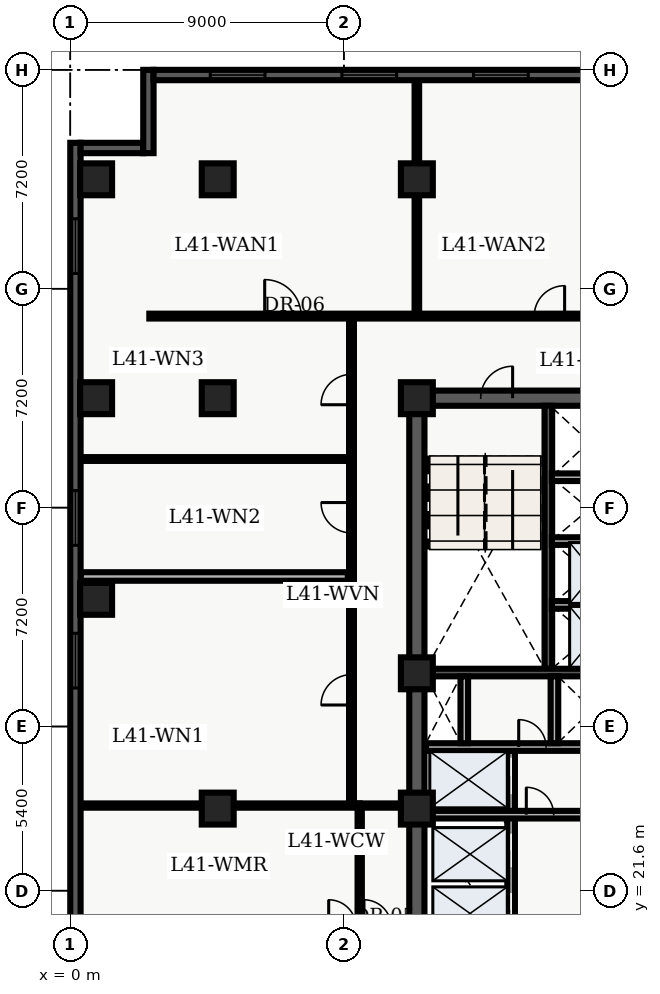
"""IFC4 building model, lengths in metres.
Left out: names, types, materials, properties, quantities, classifications, styles, units other than length and angle.
Written with IfcOpenShell. Run it as: python <this file> out.ifc"""

import sys

from ifc_helpers import new_model, entity, si_unit, converted_unit, direction, frame, origin_with_axes, origin_2d_with_axis, place, context, subcontext, project, spatial, polyline, rectangle, outline, extrude, element, fill, save


model = new_model("IFC4")
c1 = context("Model", 3, precision=1e-05, world=origin_with_axes(), true_north=direction((0.0, 1.0)))
c2 = subcontext(c1, "Body", "Model", "MODEL_VIEW")
j1 = project(units=[si_unit("LENGTHUNIT", "METRE"), converted_unit("PLANEANGLEUNIT", "DEGREE", entity("IfcPlaneAngleMeasure", 0.017), si_unit("PLANEANGLEUNIT", "RADIAN"), dimensions=[0, 0, 0, 0, 0, 0, 0])], contexts=[c1])
p1 = place(None, origin_with_axes())
s1 = spatial("IfcSite", under=j1, at=p1, CompositionType="ELEMENT")
p2 = place(p1, origin_with_axes())
s2 = spatial("IfcBuilding", under=s1, at=p2, CompositionType="ELEMENT")
p3 = place(p2, frame((0.0, 0.0, 168.0), z_axis=(0.0, 0.0, 1.0), x_axis=(1.0, 0.0, 0.0)))
s3 = spatial("IfcBuildingStorey", under=s2, at=p3, CompositionType="ELEMENT", Elevation=168.0)
p4 = place(p3, frame((11.4, 10.8, 0.0), z_axis=(0.0, 0.0, 1.0), x_axis=(0.0, 1.0, 0.0)))
e1 = element("IfcWall", 1, at=p4, inside=s3, PredefinedType="SHEAR", context=c2, shape_type="SweptSolid", body=[
    extrude(outline(polyline([(0.0, -0.25), (27.0, -0.25), (27.0, 0.25), (0.0, 0.25), (0.0, -0.25)])), origin_with_axes(), (0.0, 0.0, 1.0), 3.66),
])
p5 = place(p3, frame((11.4, 37.8, 0.0), z_axis=(0.0, 0.0, 1.0), x_axis=(1.0, 0.0, 0.0)))
e2 = element("IfcWall", 2, at=p5, inside=s3, PredefinedType="SHEAR", context=c2, shape_type="SweptSolid", body=[
    extrude(outline(polyline([(0.0, -0.25), (7.2, -0.25), (7.2, 0.25), (0.0, 0.25), (0.0, -0.25)])), origin_with_axes(), (0.0, 0.0, 1.0), 3.66),
])
p6 = place(p5, frame((2.625, 0.0, 0.0), z_axis=(0.0, 0.0, 1.0), x_axis=(1.0, 0.0, 0.0)))
e3 = element("IfcOpeningElement", 3, at=p6, cuts=e2, PredefinedType="OPENING", context=c2, shape_type="SweptSolid", body=[
    extrude(rectangle(XDim=1.05, YDim=0.52, at=origin_2d_with_axis()), origin_with_axes(), (0.0, 0.0, 1.0), 2.15),
])
p7 = place(p3, frame((15.725, 28.9, 0.0), z_axis=(0.0, 0.0, 1.0), x_axis=(0.0, 1.0, 0.0)))
e4 = element("IfcWall", 4, at=p7, inside=s3, PredefinedType="SHEAR", context=c2, shape_type="SweptSolid", body=[
    extrude(outline(polyline([(0.0, -0.125), (8.65, -0.125), (8.65, 0.125), (0.0, 0.125), (0.0, -0.125)])), origin_with_axes(), (0.0, 0.0, 1.0), 3.66),
])
p8 = place(p3, frame((11.65, 28.775, 0.0), z_axis=(0.0, 0.0, 1.0), x_axis=(1.0, 0.0, 0.0)))
e5 = element("IfcWall", 5, at=p8, inside=s3, PredefinedType="SHEAR", context=c2, shape_type="SweptSolid", body=[
    extrude(outline(polyline([(0.0, -0.125), (6.7, -0.125), (6.7, 0.125), (0.0, 0.125), (0.0, -0.125)])), origin_with_axes(), (0.0, 0.0, 1.0), 3.66),
])
p9 = place(p3, frame((14.5, 19.95, 0.0), z_axis=(0.0, 0.0, 1.0), x_axis=(0.0, 1.0, 0.0)))
e6 = element("IfcWall", 6, at=p9, inside=s3, PredefinedType="SOLIDWALL", context=c2, shape_type="SweptSolid", body=[
    extrude(outline(polyline([(0.0, -0.125), (6.25, -0.125), (6.25, 0.125), (0.0, 0.125), (0.0, -0.125)])), origin_with_axes(), (0.0, 0.0, 1.0), 2.7),
])
p10 = place(p9, frame((1.025, 0.0, 0.0), z_axis=(0.0, 0.0, 1.0), x_axis=(1.0, 0.0, 0.0)))
e7 = element("IfcOpeningElement", 7, at=p10, cuts=e6, PredefinedType="OPENING", context=c2, shape_type="SweptSolid", body=[
    extrude(rectangle(XDim=1.1, YDim=0.27, at=origin_2d_with_axis()), origin_with_axes(), (0.0, 0.0, 1.0), 2.15),
])
p11 = place(p9, frame((2.975, 0.0, 0.0), z_axis=(0.0, 0.0, 1.0), x_axis=(1.0, 0.0, 0.0)))
e8 = element("IfcOpeningElement", 8, at=p11, cuts=e6, PredefinedType="OPENING", context=c2, shape_type="SweptSolid", body=[
    extrude(rectangle(XDim=1.1, YDim=0.27, at=origin_2d_with_axis()), origin_with_axes(), (0.0, 0.0, 1.0), 2.15),
])
p12 = place(p9, frame((5.425, 0.0, 0.0), z_axis=(0.0, 0.0, 1.0), x_axis=(1.0, 0.0, 0.0)))
e9 = element("IfcOpeningElement", 9, at=p12, cuts=e6, PredefinedType="OPENING", context=c2, shape_type="SweptSolid", body=[
    extrude(rectangle(XDim=1.2, YDim=0.27, at=origin_2d_with_axis()), origin_with_axes(), (0.0, 0.0, 1.0), 2.15),
])
p13 = place(p3, frame((11.7, 24.1, 0.0), z_axis=(0.0, 0.0, 1.0), x_axis=(1.0, 0.0, 0.0)))
e10 = element("IfcWall", 10, at=p13, inside=s3, PredefinedType="SOLIDWALL", context=c2, shape_type="SweptSolid", body=[
    extrude(outline(polyline([(0.0, -0.125), (6.6, -0.125), (6.6, 0.125), (0.0, 0.125), (0.0, -0.125)])), origin_with_axes(), (0.0, 0.0, 1.0), 2.7),
])
p14 = place(p13, frame((3.75, 0.0, 0.0), z_axis=(0.0, 0.0, 1.0), x_axis=(1.0, 0.0, 0.0)))
e11 = element("IfcOpeningElement", 11, at=p14, cuts=e10, PredefinedType="OPENING", context=c2, shape_type="SweptSolid", body=[
    extrude(rectangle(XDim=0.9, YDim=0.27, at=origin_2d_with_axis()), origin_with_axes(), (0.0, 0.0, 1.0), 2.15),
])
p15 = place(p3, frame((11.7, 26.325, 0.0), z_axis=(0.0, 0.0, 1.0), x_axis=(1.0, 0.0, 0.0)))
e12 = element("IfcWall", 12, at=p15, inside=s3, PredefinedType="SOLIDWALL", context=c2, shape_type="SweptSolid", body=[
    extrude(outline(polyline([(0.0, -0.125), (6.6, -0.125), (6.6, 0.125), (0.0, 0.125), (0.0, -0.125)])), origin_with_axes(), (0.0, 0.0, 1.0), 2.7),
])
p16 = place(p15, frame((3.5, 0.0, 0.0), z_axis=(0.0, 0.0, 1.0), x_axis=(1.0, 0.0, 0.0)))
e13 = element("IfcOpeningElement", 13, at=p16, cuts=e12, PredefinedType="OPENING", context=c2, shape_type="SweptSolid", body=[
    extrude(rectangle(XDim=0.9, YDim=0.27, at=origin_2d_with_axis()), origin_with_axes(), (0.0, 0.0, 1.0), 2.15),
])
for number, where, z_axis, x_axis in (
    (14, (12.96, 26.45, 0.0), (0.0, 0.0, 1.0), (0.0, 1.0, 0.0)),
    (15, (15.925, 26.45, 0.0), (0.0, 0.0, 1.0), (0.0, 1.0, 0.0)),
):
    element("IfcWall", number, at=place(p3, frame(where, z_axis=z_axis, x_axis=x_axis)), inside=s3, PredefinedType="SOLIDWALL", context=c2, shape_type="SweptSolid", body=[
        extrude(outline(polyline([(0.0, -0.125), (2.2, -0.125), (2.2, 0.125), (0.0, 0.125), (0.0, -0.125)])), origin_with_axes(), (0.0, 0.0, 1.0), 2.7),
    ])
for number, where, z_axis, x_axis in (
    (16, (11.4, 24.3, 0.0), (0.0, 0.0, 1.0), (1.0, 0.0, 0.0)),
    (17, (11.4, 28.75, 0.0), (0.0, 0.0, 1.0), (1.0, 0.0, 0.0)),
    (18, (11.4, 37.8, 0.0), (0.0, 0.0, 1.0), (1.0, 0.0, 0.0)),
    (19, (11.4, 45.0, 0.0), (0.0, 0.0, 1.0), (1.0, 0.0, 0.0)),
    (20, (4.85, 24.3, 0.0), (0.0, 0.0, 1.0), (1.0, 0.0, 0.0)),
    (21, (4.85, 37.8, 0.0), (0.0, 0.0, 1.0), (1.0, 0.0, 0.0)),
    (22, (4.85, 45.0, 0.0), (0.0, 0.0, 1.0), (1.0, 0.0, 0.0)),
    (23, (0.85, 31.2, 0.0), (0.0, 0.0, 1.0), (1.0, 0.0, 0.0)),
    (24, (0.85, 37.8, 0.0), (0.0, 0.0, 1.0), (1.0, 0.0, 0.0)),
    (25, (0.85, 45.0, 0.0), (0.0, 0.0, 1.0), (1.0, 0.0, 0.0)),
):
    element("IfcColumn", number, at=place(p3, frame(where, z_axis=z_axis, x_axis=x_axis)), inside=s3, PredefinedType="COLUMN", context=c2, shape_type="SweptSolid", body=[
        extrude(rectangle(XDim=1.05, YDim=1.05, at=origin_2d_with_axis()), origin_with_axes(), (0.0, 0.0, 1.0), 3.9),
    ])
for number, where, z_axis, x_axis in (
    (26, (15.84, 31.0, 0.0), (0.0, 0.0, 1.0), (1.0, 0.0, 0.0)),
    (27, (15.84, 33.1, 0.0), (0.0, 0.0, 1.0), (1.0, 0.0, 0.0)),
    (28, (15.84, 35.2, 0.0), (0.0, 0.0, 1.0), (1.0, 0.0, 0.0)),
):
    element("IfcWall", number, at=place(p3, frame(where, z_axis=z_axis, x_axis=x_axis)), inside=s3, PredefinedType="SOLIDWALL", context=c2, shape_type="SweptSolid", body=[
        extrude(outline(polyline([(0.0, -0.125), (2.46, -0.125), (2.46, 0.125), (0.0, 0.125), (0.0, -0.125)])), origin_with_axes(), (0.0, 0.0, 1.0), 2.7),
    ])
p17 = place(p3, frame((9.52, 20.4, 0.0), z_axis=(0.0, 0.0, 1.0), x_axis=(0.0, 1.0, 0.0)))
e29 = element("IfcWall", 29, at=p17, inside=s3, PredefinedType="PARTITIONING", context=c2, shape_type="SweptSolid", body=[
    extrude(outline(polyline([(0.0, -0.07), (4.0, -0.07), (4.0, 0.07), (0.0, 0.07), (0.0, -0.07)])), origin_with_axes(), (0.0, 0.0, 1.0), 2.7),
])
p18 = place(p3, frame((9.52, 24.4, 0.0), z_axis=(0.0, 0.0, 1.0), x_axis=(1.0, 0.0, 0.0)))
e30 = element("IfcWall", 30, at=p18, inside=s3, PredefinedType="PARTITIONING", context=c2, shape_type="SweptSolid", body=[
    extrude(outline(polyline([(0.0, -0.07), (1.58, -0.07), (1.58, 0.07), (0.0, 0.07), (0.0, -0.07)])), origin_with_axes(), (0.0, 0.0, 1.0), 2.7),
])
p19 = place(p3, frame((2.6, 40.5, 0.0), z_axis=(0.0, 0.0, 1.0), x_axis=(1.0, 0.0, 0.0)))
e31 = element("IfcWall", 31, at=p19, inside=s3, PredefinedType="PARTITIONING", context=c2, shape_type="SweptSolid", body=[
    extrude(outline(polyline([(0.0, -0.08), (21.324, -0.08), (21.324, 0.08), (0.0, 0.08), (0.0, -0.08)])), origin_with_axes(), (0.0, 0.0, 1.0), 2.7),
])
p20 = place(p19, frame((4.395, 0.0, 0.0), z_axis=(0.0, 0.0, 1.0), x_axis=(1.0, 0.0, 0.0)))
e32 = element("IfcOpeningElement", 32, at=p20, cuts=e31, PredefinedType="OPENING", context=c2, shape_type="SweptSolid", body=[
    extrude(rectangle(XDim=1.2, YDim=0.18, at=origin_2d_with_axis()), origin_with_axes(), (0.0, 0.0, 1.0), 2.2),
])
p21 = place(p19, frame((13.16, 0.0, 0.0), z_axis=(0.0, 0.0, 1.0), x_axis=(1.0, 0.0, 0.0)))
e33 = element("IfcOpeningElement", 33, at=p21, cuts=e31, PredefinedType="OPENING", context=c2, shape_type="SweptSolid", body=[
    extrude(rectangle(XDim=1.0, YDim=0.18, at=origin_2d_with_axis()), origin_with_axes(), (0.0, 0.0, 1.0), 2.15),
])
p22 = place(p3, frame((9.25, 24.4, 0.0), z_axis=(0.0, 0.0, 1.0), x_axis=(0.0, 1.0, 0.0)))
e34 = element("IfcWall", 34, at=p22, inside=s3, PredefinedType="PARTITIONING", context=c2, shape_type="SweptSolid", body=[
    extrude(outline(polyline([(0.0, -0.08), (16.1, -0.08), (16.1, 0.08), (0.0, 0.08), (0.0, -0.08)])), origin_with_axes(), (0.0, 0.0, 1.0), 2.7),
])
p23 = place(p22, frame((3.808, 0.0, 0.0), z_axis=(0.0, 0.0, 1.0), x_axis=(1.0, 0.0, 0.0)))
e35 = element("IfcOpeningElement", 35, at=p23, cuts=e34, PredefinedType="OPENING", context=c2, shape_type="SweptSolid", body=[
    extrude(rectangle(XDim=1.0, YDim=0.18, at=origin_2d_with_axis()), origin_with_axes(), (0.0, 0.0, 1.0), 2.15),
])
p24 = place(p22, frame((9.467, 0.0, 0.0), z_axis=(0.0, 0.0, 1.0), x_axis=(1.0, 0.0, 0.0)))
e36 = element("IfcOpeningElement", 36, at=p24, cuts=e34, PredefinedType="OPENING", context=c2, shape_type="SweptSolid", body=[
    extrude(rectangle(XDim=1.0, YDim=0.18, at=origin_2d_with_axis()), origin_with_axes(), (0.0, 0.0, 1.0), 2.15),
])
p25 = place(p22, frame((13.684, 0.0, 0.0), z_axis=(0.0, 0.0, 1.0), x_axis=(1.0, 0.0, 0.0)))
e37 = element("IfcOpeningElement", 37, at=p25, cuts=e34, PredefinedType="OPENING", context=c2, shape_type="SweptSolid", body=[
    extrude(rectangle(XDim=1.0, YDim=0.18, at=origin_2d_with_axis()), origin_with_axes(), (0.0, 0.0, 1.0), 2.15),
])
p26 = place(p3, frame((0.335, 24.4, 0.0), z_axis=(0.0, 0.0, 1.0), x_axis=(1.0, 0.0, 0.0)))
e38 = element("IfcWall", 38, at=p26, inside=s3, PredefinedType="PARTITIONING", context=c2, shape_type="SweptSolid", body=[
    extrude(outline(polyline([(0.0, -0.07), (9.185, -0.07), (9.185, 0.07), (0.0, 0.07), (0.0, -0.07)])), origin_with_axes(), (0.0, 0.0, 1.0), 2.7),
])
p27 = place(p3, frame((0.335, 31.935, 0.0), z_axis=(0.0, 0.0, 1.0), x_axis=(1.0, 0.0, 0.0)))
e39 = element("IfcWall", 39, at=p27, inside=s3, PredefinedType="PARTITIONING", context=c2, shape_type="SweptSolid", body=[
    extrude(outline(polyline([(0.0, -0.14), (8.795, -0.14), (8.795, 0.14), (0.0, 0.14), (0.0, -0.14)])), origin_with_axes(), (0.0, 0.0, 1.0), 2.7),
])
p28 = place(p3, frame((0.335, 35.799, 0.0), z_axis=(0.0, 0.0, 1.0), x_axis=(1.0, 0.0, 0.0)))
e40 = element("IfcWall", 40, at=p28, inside=s3, PredefinedType="PARTITIONING", context=c2, shape_type="SweptSolid", body=[
    extrude(outline(polyline([(0.0, -0.062), (8.795, -0.062), (8.795, 0.062), (0.0, 0.062), (0.0, -0.062)])), origin_with_axes(), (0.0, 0.0, 1.0), 2.7),
])
p29 = place(p3, frame((11.4, 40.6, 0.0), z_axis=(0.0, 0.0, 1.0), x_axis=(0.0, 1.0, 0.0)))
e41 = element("IfcWall", 41, at=p29, inside=s3, PredefinedType="PARTITIONING", context=c2, shape_type="SweptSolid", body=[
    extrude(outline(polyline([(0.0, -0.075), (7.665, -0.075), (7.665, 0.075), (0.0, 0.075), (0.0, -0.075)])), origin_with_axes(), (0.0, 0.0, 1.0), 2.7),
])
p30 = place(p3, frame((0.17, 2.74, 0.0), z_axis=(0.0, 0.0, 1.0), x_axis=(0.0, 1.0, 0.0)))
e42 = element("IfcWall", 42, at=p30, inside=s3, PredefinedType="SOLIDWALL", context=c2, shape_type="SweptSolid", body=[
    extrude(outline(polyline([(0.0, -0.17), (43.46, -0.17), (43.46, 0.17), (0.0, 0.17), (0.0, -0.17)])), origin_with_axes(), (0.0, 0.0, 1.0), 3.66),
])
p31 = place(p30, frame((2.948, 0.0, 0.45), z_axis=(0.0, 0.0, 1.0), x_axis=(1.0, 0.0, 0.0)))
e43 = element("IfcOpeningElement", 43, at=p31, cuts=e42, PredefinedType="OPENING", context=c2, shape_type="SweptSolid", body=[
    extrude(rectangle(XDim=1.8, YDim=0.36, at=origin_2d_with_axis()), origin_with_axes(), (0.0, 0.0, 1.0), 2.1),
])
p32 = place(p30, frame((12.339, 0.0, 0.45), z_axis=(0.0, 0.0, 1.0), x_axis=(1.0, 0.0, 0.0)))
e44 = element("IfcOpeningElement", 44, at=p32, cuts=e42, PredefinedType="OPENING", context=c2, shape_type="SweptSolid", body=[
    extrude(rectangle(XDim=1.8, YDim=0.36, at=origin_2d_with_axis()), origin_with_axes(), (0.0, 0.0, 1.0), 2.1),
])
p33 = place(p30, frame((26.426, 0.0, 0.45), z_axis=(0.0, 0.0, 1.0), x_axis=(1.0, 0.0, 0.0)))
e45 = element("IfcOpeningElement", 45, at=p33, cuts=e42, PredefinedType="OPENING", context=c2, shape_type="SweptSolid", body=[
    extrude(rectangle(XDim=1.8, YDim=0.36, at=origin_2d_with_axis()), origin_with_axes(), (0.0, 0.0, 1.0), 2.1),
])
p34 = place(p30, frame((31.121, 0.0, 0.45), z_axis=(0.0, 0.0, 1.0), x_axis=(1.0, 0.0, 0.0)))
e46 = element("IfcOpeningElement", 46, at=p34, cuts=e42, PredefinedType="OPENING", context=c2, shape_type="SweptSolid", body=[
    extrude(rectangle(XDim=1.8, YDim=0.36, at=origin_2d_with_axis()), origin_with_axes(), (0.0, 0.0, 1.0), 2.1),
])
p35 = place(p30, frame((40.062, 0.0, 0.45), z_axis=(0.0, 0.0, 1.0), x_axis=(1.0, 0.0, 0.0)))
e47 = element("IfcOpeningElement", 47, at=p35, cuts=e42, PredefinedType="OPENING", context=c2, shape_type="SweptSolid", body=[
    extrude(rectangle(XDim=1.8, YDim=0.36, at=origin_2d_with_axis()), origin_with_axes(), (0.0, 0.0, 1.0), 2.1),
])
p36 = place(p3, frame((0.34, 46.03, 0.0), z_axis=(0.0, 0.0, 1.0), x_axis=(1.0, 0.0, 0.0)))
e48 = element("IfcWall", 48, at=p36, inside=s3, PredefinedType="SOLIDWALL", context=c2, shape_type="SweptSolid", body=[
    extrude(outline(polyline([(0.0, -0.17), (2.06, -0.17), (2.06, 0.17), (0.0, 0.17), (0.0, -0.17)])), origin_with_axes(), (0.0, 0.0, 1.0), 3.66),
])
p37 = place(p3, frame((2.57, 45.86, 0.0), z_axis=(0.0, 0.0, 1.0), x_axis=(0.0, 1.0, 0.0)))
e49 = element("IfcWall", 49, at=p37, inside=s3, PredefinedType="SOLIDWALL", context=c2, shape_type="SweptSolid", body=[
    extrude(outline(polyline([(0.0, -0.17), (2.74, -0.17), (2.74, 0.17), (0.0, 0.17), (0.0, -0.17)])), origin_with_axes(), (0.0, 0.0, 1.0), 3.66),
])
p38 = place(p3, frame((2.74, 48.43, 0.0), z_axis=(0.0, 0.0, 1.0), x_axis=(1.0, 0.0, 0.0)))
e50 = element("IfcWall", 50, at=p38, inside=s3, PredefinedType="SOLIDWALL", context=c2, shape_type="SweptSolid", body=[
    extrude(outline(polyline([(0.0, -0.17), (18.519, -0.17), (18.519, 0.17), (0.0, 0.17), (0.0, -0.17)])), origin_with_axes(), (0.0, 0.0, 1.0), 3.66),
])
p39 = place(p38, frame((2.765, 0.0, 0.45), z_axis=(0.0, 0.0, 1.0), x_axis=(1.0, 0.0, 0.0)))
e51 = element("IfcOpeningElement", 51, at=p39, cuts=e50, PredefinedType="OPENING", context=c2, shape_type="SweptSolid", body=[
    extrude(rectangle(XDim=1.8, YDim=0.36, at=origin_2d_with_axis()), origin_with_axes(), (0.0, 0.0, 1.0), 2.1),
])
p40 = place(p38, frame((7.095, 0.0, 0.45), z_axis=(0.0, 0.0, 1.0), x_axis=(1.0, 0.0, 0.0)))
e52 = element("IfcOpeningElement", 52, at=p40, cuts=e50, PredefinedType="OPENING", context=c2, shape_type="SweptSolid", body=[
    extrude(rectangle(XDim=1.8, YDim=0.36, at=origin_2d_with_axis()), origin_with_axes(), (0.0, 0.0, 1.0), 2.1),
])
p41 = place(p38, frame((11.424, 0.0, 0.45), z_axis=(0.0, 0.0, 1.0), x_axis=(1.0, 0.0, 0.0)))
e53 = element("IfcOpeningElement", 53, at=p41, cuts=e50, PredefinedType="OPENING", context=c2, shape_type="SweptSolid", body=[
    extrude(rectangle(XDim=1.8, YDim=0.36, at=origin_2d_with_axis()), origin_with_axes(), (0.0, 0.0, 1.0), 2.1),
])
p42 = place(p38, frame((15.754, 0.0, 0.45), z_axis=(0.0, 0.0, 1.0), x_axis=(1.0, 0.0, 0.0)))
e54 = element("IfcOpeningElement", 54, at=p42, cuts=e50, PredefinedType="OPENING", context=c2, shape_type="SweptSolid", body=[
    extrude(rectangle(XDim=1.8, YDim=0.36, at=origin_2d_with_axis()), origin_with_axes(), (0.0, 0.0, 1.0), 2.1),
])
p43 = place(p9, frame((1.025, 0.0, 0.0), z_axis=(0.0, 0.0, 1.0), x_axis=(1.0, 0.0, 0.0)))
e55 = element("IfcDoor", 55, at=p43, inside=s3, OperationType="SLIDING_TO_LEFT", PredefinedType="DOOR", context=c2, shape_type="SweptSolid", body=[
    extrude(rectangle(XDim=1.1, YDim=0.09, at=origin_2d_with_axis()), origin_with_axes(), (0.0, 0.0, 1.0), 2.15),
])
fill(e7, e55)
p44 = place(p9, frame((2.975, 0.0, 0.0), z_axis=(0.0, 0.0, 1.0), x_axis=(1.0, 0.0, 0.0)))
e56 = element("IfcDoor", 56, at=p44, inside=s3, OperationType="SLIDING_TO_RIGHT", PredefinedType="DOOR", context=c2, shape_type="SweptSolid", body=[
    extrude(rectangle(XDim=1.1, YDim=0.09, at=origin_2d_with_axis()), origin_with_axes(), (0.0, 0.0, 1.0), 2.15),
])
fill(e8, e56)
p45 = place(p9, frame((5.425, 0.0, 0.0), z_axis=(0.0, 0.0, 1.0), x_axis=(1.0, 0.0, 0.0)))
e57 = element("IfcDoor", 57, at=p45, inside=s3, OperationType="DOUBLE_DOOR_SLIDING", PredefinedType="DOOR", context=c2, shape_type="SweptSolid", body=[
    extrude(rectangle(XDim=1.2, YDim=0.09, at=origin_2d_with_axis()), origin_with_axes(), (0.0, 0.0, 1.0), 2.15),
])
fill(e9, e57)
p46 = place(p5, frame((2.625, 0.0, 0.0), z_axis=(0.0, 0.0, 1.0), x_axis=(1.0, 0.0, 0.0)))
e58 = element("IfcDoor", 58, at=p46, inside=s3, OperationType="SINGLE_SWING_RIGHT", PredefinedType="DOOR", context=c2, shape_type="SweptSolid", body=[
    extrude(rectangle(XDim=1.05, YDim=0.09, at=origin_2d_with_axis()), origin_with_axes(), (0.0, 0.0, 1.0), 2.15),
])
fill(e3, e58)
p47 = place(p13, frame((3.75, 0.0, 0.0), z_axis=(0.0, 0.0, 1.0), x_axis=(1.0, 0.0, 0.0)))
e59 = element("IfcDoor", 59, at=p47, inside=s3, OperationType="SINGLE_SWING_LEFT", PredefinedType="DOOR", context=c2, shape_type="SweptSolid", body=[
    extrude(rectangle(XDim=0.9, YDim=0.09, at=origin_2d_with_axis()), origin_with_axes(), (0.0, 0.0, 1.0), 2.15),
])
fill(e11, e59)
p48 = place(p15, frame((3.5, 0.0, 0.0), z_axis=(0.0, 0.0, 1.0), x_axis=(1.0, 0.0, 0.0)))
e60 = element("IfcDoor", 60, at=p48, inside=s3, OperationType="SINGLE_SWING_LEFT", PredefinedType="DOOR", context=c2, shape_type="SweptSolid", body=[
    extrude(rectangle(XDim=0.9, YDim=0.09, at=origin_2d_with_axis()), origin_with_axes(), (0.0, 0.0, 1.0), 2.15),
])
fill(e13, e60)
p49 = place(p22, frame((3.808, 0.0, 0.0), z_axis=(0.0, 0.0, 1.0), x_axis=(1.0, 0.0, 0.0)))
e61 = element("IfcDoor", 61, at=p49, inside=s3, OperationType="SINGLE_SWING_LEFT", PredefinedType="DOOR", context=c2, shape_type="SweptSolid", body=[
    extrude(rectangle(XDim=1.0, YDim=0.09, at=origin_2d_with_axis()), origin_with_axes(), (0.0, 0.0, 1.0), 2.15),
])
fill(e35, e61)
p50 = place(p22, frame((9.467, 0.0, 0.0), z_axis=(0.0, 0.0, 1.0), x_axis=(1.0, 0.0, 0.0)))
e62 = element("IfcDoor", 62, at=p50, inside=s3, OperationType="SINGLE_SWING_RIGHT", PredefinedType="DOOR", context=c2, shape_type="SweptSolid", body=[
    extrude(rectangle(XDim=1.0, YDim=0.09, at=origin_2d_with_axis()), origin_with_axes(), (0.0, 0.0, 1.0), 2.15),
])
fill(e36, e62)
p51 = place(p22, frame((13.684, 0.0, 0.0), z_axis=(0.0, 0.0, 1.0), x_axis=(1.0, 0.0, 0.0)))
e63 = element("IfcDoor", 63, at=p51, inside=s3, OperationType="SINGLE_SWING_LEFT", PredefinedType="DOOR", context=c2, shape_type="SweptSolid", body=[
    extrude(rectangle(XDim=1.0, YDim=0.09, at=origin_2d_with_axis()), origin_with_axes(), (0.0, 0.0, 1.0), 2.15),
])
fill(e37, e63)
p52 = place(p19, frame((4.395, 0.0, 0.0), z_axis=(0.0, 0.0, 1.0), x_axis=(1.0, 0.0, 0.0)))
e64 = element("IfcDoor", 64, at=p52, inside=s3, OperationType="SINGLE_SWING_LEFT", PredefinedType="DOOR", context=c2, shape_type="SweptSolid", body=[
    extrude(rectangle(XDim=1.2, YDim=0.09, at=origin_2d_with_axis()), origin_with_axes(), (0.0, 0.0, 1.0), 2.2),
])
fill(e32, e64)
p53 = place(p19, frame((13.16, 0.0, 0.0), z_axis=(0.0, 0.0, 1.0), x_axis=(1.0, 0.0, 0.0)))
e65 = element("IfcDoor", 65, at=p53, inside=s3, OperationType="SINGLE_SWING_RIGHT", PredefinedType="DOOR", context=c2, shape_type="SweptSolid", body=[
    extrude(rectangle(XDim=1.0, YDim=0.09, at=origin_2d_with_axis()), origin_with_axes(), (0.0, 0.0, 1.0), 2.15),
])
fill(e33, e65)
p54 = place(p30, frame((26.426, 0.0, 0.45), z_axis=(0.0, 0.0, 1.0), x_axis=(1.0, 0.0, 0.0)))
e66 = element("IfcWindow", 66, at=p54, inside=s3, PredefinedType="WINDOW", context=c2, shape_type="SweptSolid", body=[
    extrude(rectangle(XDim=1.8, YDim=0.09, at=origin_2d_with_axis()), origin_with_axes(), (0.0, 0.0, 1.0), 2.1),
])
fill(e45, e66)
p55 = place(p30, frame((31.121, 0.0, 0.45), z_axis=(0.0, 0.0, 1.0), x_axis=(1.0, 0.0, 0.0)))
e67 = element("IfcWindow", 67, at=p55, inside=s3, PredefinedType="WINDOW", context=c2, shape_type="SweptSolid", body=[
    extrude(rectangle(XDim=1.8, YDim=0.09, at=origin_2d_with_axis()), origin_with_axes(), (0.0, 0.0, 1.0), 2.1),
])
fill(e46, e67)
p56 = place(p30, frame((40.062, 0.0, 0.45), z_axis=(0.0, 0.0, 1.0), x_axis=(1.0, 0.0, 0.0)))
e68 = element("IfcWindow", 68, at=p56, inside=s3, PredefinedType="WINDOW", context=c2, shape_type="SweptSolid", body=[
    extrude(rectangle(XDim=1.8, YDim=0.09, at=origin_2d_with_axis()), origin_with_axes(), (0.0, 0.0, 1.0), 2.1),
])
fill(e47, e68)
p57 = place(p38, frame((2.765, 0.0, 0.45), z_axis=(0.0, 0.0, 1.0), x_axis=(1.0, 0.0, 0.0)))
e69 = element("IfcWindow", 69, at=p57, inside=s3, PredefinedType="WINDOW", context=c2, shape_type="SweptSolid", body=[
    extrude(rectangle(XDim=1.8, YDim=0.09, at=origin_2d_with_axis()), origin_with_axes(), (0.0, 0.0, 1.0), 2.1),
])
fill(e51, e69)
p58 = place(p38, frame((7.095, 0.0, 0.45), z_axis=(0.0, 0.0, 1.0), x_axis=(1.0, 0.0, 0.0)))
e70 = element("IfcWindow", 70, at=p58, inside=s3, PredefinedType="WINDOW", context=c2, shape_type="SweptSolid", body=[
    extrude(rectangle(XDim=1.8, YDim=0.09, at=origin_2d_with_axis()), origin_with_axes(), (0.0, 0.0, 1.0), 2.1),
])
fill(e52, e70)
p59 = place(p38, frame((11.424, 0.0, 0.45), z_axis=(0.0, 0.0, 1.0), x_axis=(1.0, 0.0, 0.0)))
e71 = element("IfcWindow", 71, at=p59, inside=s3, PredefinedType="WINDOW", context=c2, shape_type="SweptSolid", body=[
    extrude(rectangle(XDim=1.8, YDim=0.09, at=origin_2d_with_axis()), origin_with_axes(), (0.0, 0.0, 1.0), 2.1),
])
fill(e53, e71)
save(model, sys.argv[1])
